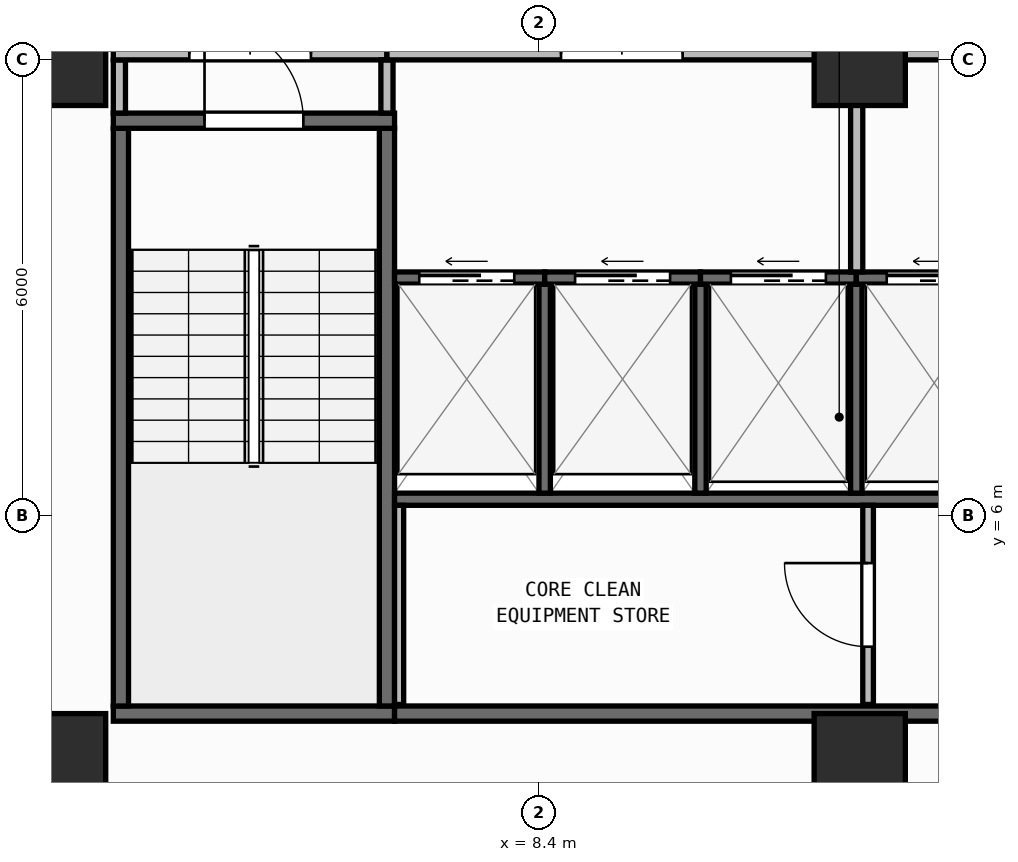
"""IFC4 building model, lengths in metres.
Left out: names, types, materials, properties, quantities, classifications, styles, units other than length and angle.
Written with IfcOpenShell. Run it as: python <this file> out.ifc"""

import sys

from ifc_helpers import new_model, si_unit, direction, frame, frame_2d, origin, origin_2d, place, context, subcontext, project, spatial, rectangle, extrude, element, fill, save


model = new_model("IFC4")
c1 = context("Model", 3, precision=1e-05, world=origin(), true_north=direction((0.0, 1.0)))
c2 = subcontext(c1, "Body", "Model", "MODEL_VIEW")
j1 = project(units=[si_unit("LENGTHUNIT", "METRE"), si_unit("PLANEANGLEUNIT", "RADIAN")], contexts=[c1])
p1 = place(None, origin())
s1 = spatial("IfcSite", under=j1, at=p1, CompositionType="ELEMENT")
p2 = place(p1, origin())
s2 = spatial("IfcBuilding", under=s1, at=p2, CompositionType="ELEMENT")
p3 = place(p2, frame((0.0, 0.0, 170.5)))
s3 = spatial("IfcBuildingStorey", under=s2, at=p3, CompositionType="ELEMENT", Elevation=170.5)
for number, where, z_axis, x_axis in (
    (1, (2.1, 2.8, 0.0), (0.0, 0.0, 1.0), (1.0, 0.0, 0.0)),
    (2, (12.62, 2.8, 0.0), (0.0, 0.0, 1.0), (1.0, 0.0, 0.0)),
    (3, (2.1, 12.0, 0.0), (0.0, 0.0, 1.0), (1.0, 0.0, 0.0)),
    (4, (12.62, 12.0, 0.0), (0.0, 0.0, 1.0), (1.0, 0.0, 0.0)),
):
    element("IfcColumn", number, at=place(p3, frame(where, z_axis=z_axis, x_axis=x_axis)), inside=s3, PredefinedType="COLUMN", context=c2, shape_type="SweptSolid", body=[
        extrude(rectangle(XDim=1.2, YDim=1.2, at=origin_2d()), origin(), (0.0, 0.0, 1.0), 3.95),
    ])
p4 = place(p3, frame((2.76, 0.173, 0.0), z_axis=(0.0, 0.0, 1.0), x_axis=(0.996857931723, 0.079210251617, 0.0)))
e5 = element("IfcWall", 5, at=p4, inside=s3, PredefinedType="STANDARD", context=c2, shape_type="SweptSolid", body=[
    extrude(rectangle(XDim=51.442, YDim=0.26, at=frame_2d((25.721, 0.0))), origin(), (0.0, 0.0, 1.0), 3.67),
])
p5 = place(p4, frame((24.521, 0.0, 0.9)))
e6 = element("IfcOpeningElement", 6, at=p5, cuts=e5, PredefinedType="OPENING", context=c2, shape_type="SweptSolid", body=[
    extrude(rectangle(XDim=2.4, YDim=1.65, at=frame_2d((1.2, 0.825))), frame((0.0, 0.14, 0.0), z_axis=(0.0, -1.0, 0.0), x_axis=(1.0, 0.0, 0.0)), (0.0, 0.0, 1.0), 0.28),
])
p6 = place(p3, frame((2.8, 3.4, 0.0), z_axis=(0.0, 0.0, 1.0), x_axis=(1.0, 0.0, 0.0)))
e7 = element("IfcWall", 7, at=p6, inside=s3, PredefinedType="SHEAR", context=c2, shape_type="SweptSolid", body=[
    extrude(rectangle(XDim=3.7, YDim=0.2, at=frame_2d((1.85, 0.0))), origin(), (0.0, 0.0, 1.0), 3.67),
])
for number, where, z_axis, x_axis in (
    (8, (2.9, 3.5, 0.0), (0.0, 0.0, 1.0), (0.0, 1.0, 0.0)),
    (9, (6.4, 3.5, 0.0), (0.0, 0.0, 1.0), (0.0, 1.0, 0.0)),
):
    element("IfcWall", number, at=place(p3, frame(where, z_axis=z_axis, x_axis=x_axis)), inside=s3, PredefinedType="SHEAR", context=c2, shape_type="SweptSolid", body=[
        extrude(rectangle(XDim=7.6, YDim=0.2, at=frame_2d((3.8, 0.0))), origin(), (0.0, 0.0, 1.0), 3.67),
    ])
p7 = place(p3, frame((2.8, 11.2, 0.0), z_axis=(0.0, 0.0, 1.0), x_axis=(1.0, 0.0, 0.0)))
e10 = element("IfcWall", 10, at=p7, inside=s3, PredefinedType="SHEAR", context=c2, shape_type="SweptSolid", body=[
    extrude(rectangle(XDim=3.7, YDim=0.2, at=frame_2d((1.85, 0.0))), origin(), (0.0, 0.0, 1.0), 3.67),
])
p8 = place(p7, frame((1.2, 0.0, 0.0)))
e11 = element("IfcOpeningElement", 11, at=p8, cuts=e10, PredefinedType="OPENING", context=c2, shape_type="SweptSolid", body=[
    extrude(rectangle(XDim=1.3, YDim=2.15, at=frame_2d((0.65, 1.075))), frame((0.0, 0.11, 0.0), z_axis=(0.0, -1.0, 0.0), x_axis=(1.0, 0.0, 0.0)), (0.0, 0.0, 1.0), 0.22),
])
p9 = place(p3, frame((6.5, 3.4, 0.0), z_axis=(0.0, 0.0, 1.0), x_axis=(1.0, 0.0, 0.0)))
e12 = element("IfcWall", 12, at=p9, inside=s3, PredefinedType="SHEAR", context=c2, shape_type="SweptSolid", body=[
    extrude(rectangle(XDim=13.7, YDim=0.2, at=frame_2d((6.85, 0.0))), origin(), (0.0, 0.0, 1.0), 3.67),
])
p10 = place(p3, frame((6.5, 6.22, 0.0), z_axis=(0.0, 0.0, 1.0), x_axis=(1.0, 0.0, 0.0)))
e13 = element("IfcWall", 13, at=p10, inside=s3, PredefinedType="SHEAR", context=c2, shape_type="SweptSolid", body=[
    extrude(rectangle(XDim=12.11, YDim=0.16, at=frame_2d((6.055, 0.0))), origin(), (0.0, 0.0, 1.0), 3.67),
])
for number, where, z_axis, x_axis in (
    (14, (8.475, 6.3, 0.0), (0.0, 0.0, 1.0), (0.0, 1.0, 0.0)),
    (15, (10.525, 6.3, 0.0), (0.0, 0.0, 1.0), (0.0, 1.0, 0.0)),
    (16, (12.575, 6.3, 0.0), (0.0, 0.0, 1.0), (0.0, 1.0, 0.0)),
):
    element("IfcWall", number, at=place(p3, frame(where, z_axis=z_axis, x_axis=x_axis)), inside=s3, PredefinedType="SHEAR", context=c2, shape_type="SweptSolid", body=[
        extrude(rectangle(XDim=2.75, YDim=0.15, at=frame_2d((1.375, 0.0))), origin(), (0.0, 0.0, 1.0), 3.67),
    ])
p11 = place(p3, frame((6.5, 9.13, 0.0), z_axis=(0.0, 0.0, 1.0), x_axis=(1.0, 0.0, 0.0)))
e17 = element("IfcWall", 17, at=p11, inside=s3, PredefinedType="SHEAR", context=c2, shape_type="SweptSolid", body=[
    extrude(rectangle(XDim=1.975, YDim=0.16, at=frame_2d((0.988, 0.0))), origin(), (0.0, 0.0, 1.0), 3.67),
])
p12 = place(p11, frame((0.325, 0.0, 0.0)))
e18 = element("IfcOpeningElement", 18, at=p12, cuts=e17, PredefinedType="OPENING", context=c2, shape_type="SweptSolid", body=[
    extrude(rectangle(XDim=1.25, YDim=2.15, at=frame_2d((0.625, 1.075))), frame((0.0, 0.09, 0.0), z_axis=(0.0, -1.0, 0.0), x_axis=(1.0, 0.0, 0.0)), (0.0, 0.0, 1.0), 0.18),
])
p13 = place(p3, frame((8.475, 9.13, 0.0), z_axis=(0.0, 0.0, 1.0), x_axis=(1.0, 0.0, 0.0)))
e19 = element("IfcWall", 19, at=p13, inside=s3, PredefinedType="SHEAR", context=c2, shape_type="SweptSolid", body=[
    extrude(rectangle(XDim=2.05, YDim=0.16, at=frame_2d((1.025, 0.0))), origin(), (0.0, 0.0, 1.0), 3.67),
])
p14 = place(p13, frame((0.4, 0.0, 0.0)))
e20 = element("IfcOpeningElement", 20, at=p14, cuts=e19, PredefinedType="OPENING", context=c2, shape_type="SweptSolid", body=[
    extrude(rectangle(XDim=1.25, YDim=2.15, at=frame_2d((0.625, 1.075))), frame((0.0, 0.09, 0.0), z_axis=(0.0, -1.0, 0.0), x_axis=(1.0, 0.0, 0.0)), (0.0, 0.0, 1.0), 0.18),
])
p15 = place(p3, frame((10.525, 9.13, 0.0), z_axis=(0.0, 0.0, 1.0), x_axis=(1.0, 0.0, 0.0)))
e21 = element("IfcWall", 21, at=p15, inside=s3, PredefinedType="SHEAR", context=c2, shape_type="SweptSolid", body=[
    extrude(rectangle(XDim=2.05, YDim=0.16, at=frame_2d((1.025, 0.0))), origin(), (0.0, 0.0, 1.0), 3.67),
])
p16 = place(p15, frame((0.4, 0.0, 0.0)))
e22 = element("IfcOpeningElement", 22, at=p16, cuts=e21, PredefinedType="OPENING", context=c2, shape_type="SweptSolid", body=[
    extrude(rectangle(XDim=1.25, YDim=2.15, at=frame_2d((0.625, 1.075))), frame((0.0, 0.09, 0.0), z_axis=(0.0, -1.0, 0.0), x_axis=(1.0, 0.0, 0.0)), (0.0, 0.0, 1.0), 0.18),
])
p17 = place(p3, frame((12.575, 9.13, 0.0), z_axis=(0.0, 0.0, 1.0), x_axis=(1.0, 0.0, 0.0)))
e23 = element("IfcWall", 23, at=p17, inside=s3, PredefinedType="SHEAR", context=c2, shape_type="SweptSolid", body=[
    extrude(rectangle(XDim=2.05, YDim=0.16, at=frame_2d((1.025, 0.0))), origin(), (0.0, 0.0, 1.0), 3.67),
])
p18 = place(p17, frame((0.4, 0.0, 0.0)))
e24 = element("IfcOpeningElement", 24, at=p18, cuts=e23, PredefinedType="OPENING", context=c2, shape_type="SweptSolid", body=[
    extrude(rectangle(XDim=1.25, YDim=2.15, at=frame_2d((0.625, 1.075))), frame((0.0, 0.09, 0.0), z_axis=(0.0, -1.0, 0.0), x_axis=(1.0, 0.0, 0.0)), (0.0, 0.0, 1.0), 0.18),
])
p19 = place(p3, frame((6.56, 3.52, 0.0), z_axis=(0.0, 0.0, 1.0), x_axis=(0.0, 1.0, 0.0)))
e25 = element("IfcWall", 25, at=p19, inside=s3, PredefinedType="PARTITIONING", context=c2, shape_type="SweptSolid", body=[
    extrude(rectangle(XDim=2.62, YDim=0.12, at=frame_2d((1.31, 0.0))), origin(), (0.0, 0.0, 1.0), 3.67),
])
p20 = place(p3, frame((12.73, 3.52, 0.0), z_axis=(0.0, 0.0, 1.0), x_axis=(0.0, 1.0, 0.0)))
e26 = element("IfcWall", 26, at=p20, inside=s3, PredefinedType="PARTITIONING", context=c2, shape_type="SweptSolid", body=[
    extrude(rectangle(XDim=2.62, YDim=0.14, at=frame_2d((1.31, 0.0))), origin(), (0.0, 0.0, 1.0), 3.67),
])
p21 = place(p20, frame((0.76, 0.0, 0.0)))
e27 = element("IfcOpeningElement", 27, at=p21, cuts=e26, PredefinedType="OPENING", context=c2, shape_type="SweptSolid", body=[
    extrude(rectangle(XDim=1.1, YDim=2.1, at=frame_2d((0.55, 1.05))), frame((0.0, 0.08, 0.0), z_axis=(0.0, -1.0, 0.0), x_axis=(1.0, 0.0, 0.0)), (0.0, 0.0, 1.0), 0.16),
])
p22 = place(p3, frame((2.88, 11.3, 0.0), z_axis=(0.0, 0.0, 1.0), x_axis=(0.0, 1.0, 0.0)))
e28 = element("IfcWall", 28, at=p22, inside=s3, PredefinedType="PARTITIONING", context=c2, shape_type="SweptSolid", body=[
    extrude(rectangle(XDim=0.7, YDim=0.16, at=frame_2d((0.35, 0.0))), origin(), (0.0, 0.0, 1.0), 3.67),
])
p23 = place(p3, frame((2.8, 12.08, 0.0), z_axis=(0.0, 0.0, 1.0), x_axis=(1.0, 0.0, 0.0)))
e29 = element("IfcWall", 29, at=p23, inside=s3, PredefinedType="PARTITIONING", context=c2, shape_type="SweptSolid", body=[
    extrude(rectangle(XDim=3.6, YDim=0.16, at=frame_2d((1.8, 0.0))), origin(), (0.0, 0.0, 1.0), 3.043),
])
p24 = place(p23, frame((1.0, 0.0, 0.0)))
e30 = element("IfcOpeningElement", 30, at=p24, cuts=e29, PredefinedType="OPENING", context=c2, shape_type="SweptSolid", body=[
    extrude(rectangle(XDim=1.6, YDim=2.05, at=frame_2d((0.8, 1.025))), frame((0.0, 0.09, 0.0), z_axis=(0.0, -1.0, 0.0), x_axis=(1.0, 0.0, 0.0)), (0.0, 0.0, 1.0), 0.18),
])
p25 = place(p3, frame((6.4, 11.3, 0.0), z_axis=(0.0, 0.0, 1.0), x_axis=(0.0, 1.0, 0.0)))
e31 = element("IfcWall", 31, at=p25, inside=s3, PredefinedType="PARTITIONING", context=c2, shape_type="SweptSolid", body=[
    extrude(rectangle(XDim=0.7, YDim=0.16, at=frame_2d((0.35, 0.0))), origin(), (0.0, 0.0, 1.0), 3.67),
])
p26 = place(p3, frame((6.4, 12.08, 0.0), z_axis=(0.0, 0.0, 1.0), x_axis=(1.0, 0.0, 0.0)))
e32 = element("IfcWall", 32, at=p26, inside=s3, PredefinedType="PARTITIONING", context=c2, shape_type="SweptSolid", body=[
    extrude(rectangle(XDim=6.18, YDim=0.16, at=frame_2d((3.09, 0.0))), origin(), (0.0, 0.0, 1.0), 3.043),
])
p27 = place(p26, frame((2.29, 0.0, 0.0)))
e33 = element("IfcOpeningElement", 33, at=p27, cuts=e32, PredefinedType="OPENING", context=c2, shape_type="SweptSolid", body=[
    extrude(rectangle(XDim=1.6, YDim=2.05, at=frame_2d((0.8, 1.025))), frame((0.0, 0.09, 0.0), z_axis=(0.0, -1.0, 0.0), x_axis=(1.0, 0.0, 0.0)), (0.0, 0.0, 1.0), 0.18),
])
p28 = place(p3, frame((12.58, 9.21, 0.0), z_axis=(0.0, 0.0, 1.0), x_axis=(0.0, 1.0, 0.0)))
e34 = element("IfcWall", 34, at=p28, inside=s3, PredefinedType="PARTITIONING", context=c2, shape_type="SweptSolid", body=[
    extrude(rectangle(XDim=2.79, YDim=0.16, at=frame_2d((1.395, 0.0))), origin(), (0.0, 0.0, 1.0), 3.67),
])
p29 = place(p3, frame((12.58, 12.08, 0.0), z_axis=(0.0, 0.0, 1.0), x_axis=(1.0, 0.0, 0.0)))
e35 = element("IfcWall", 35, at=p29, inside=s3, PredefinedType="PARTITIONING", context=c2, shape_type="SweptSolid", body=[
    extrude(rectangle(XDim=7.7, YDim=0.16, at=frame_2d((3.85, 0.0))), origin(), (0.0, 0.0, 1.0), 3.043),
])
p30 = place(p29, frame((3.05, 0.0, 0.0)))
e36 = element("IfcOpeningElement", 36, at=p30, cuts=e35, PredefinedType="OPENING", context=c2, shape_type="SweptSolid", body=[
    extrude(rectangle(XDim=1.6, YDim=2.05, at=frame_2d((0.8, 1.025))), frame((0.0, 0.09, 0.0), z_axis=(0.0, -1.0, 0.0), x_axis=(1.0, 0.0, 0.0)), (0.0, 0.0, 1.0), 0.18),
])
p31 = place(p8, origin())
e37 = element("IfcDoor", 37, at=p31, inside=s3, OperationType="SINGLE_SWING_LEFT", PredefinedType="DOOR", context=c2, shape_type="SweptSolid", body=[
    extrude(rectangle(XDim=1.3, YDim=2.15, at=frame_2d((0.65, 1.075))), frame((0.0, 0.025, 0.0), z_axis=(0.0, -1.0, 0.0), x_axis=(1.0, 0.0, 0.0)), (0.0, 0.0, 1.0), 0.05),
])
fill(e11, e37)
p32 = place(p12, origin())
e38 = element("IfcDoor", 38, at=p32, inside=s3, OperationType="SLIDING_TO_LEFT", PredefinedType="DOOR", context=c2, shape_type="SweptSolid", body=[
    extrude(rectangle(XDim=1.25, YDim=2.15, at=frame_2d((0.625, 1.075))), frame((0.0, 0.025, 0.0), z_axis=(0.0, -1.0, 0.0), x_axis=(1.0, 0.0, 0.0)), (0.0, 0.0, 1.0), 0.05),
])
fill(e18, e38)
p33 = place(p14, origin())
e39 = element("IfcDoor", 39, at=p33, inside=s3, OperationType="SLIDING_TO_LEFT", PredefinedType="DOOR", context=c2, shape_type="SweptSolid", body=[
    extrude(rectangle(XDim=1.25, YDim=2.15, at=frame_2d((0.625, 1.075))), frame((0.0, 0.025, 0.0), z_axis=(0.0, -1.0, 0.0), x_axis=(1.0, 0.0, 0.0)), (0.0, 0.0, 1.0), 0.05),
])
fill(e20, e39)
p34 = place(p16, origin())
e40 = element("IfcDoor", 40, at=p34, inside=s3, OperationType="SLIDING_TO_LEFT", PredefinedType="DOOR", context=c2, shape_type="SweptSolid", body=[
    extrude(rectangle(XDim=1.25, YDim=2.15, at=frame_2d((0.625, 1.075))), frame((0.0, 0.025, 0.0), z_axis=(0.0, -1.0, 0.0), x_axis=(1.0, 0.0, 0.0)), (0.0, 0.0, 1.0), 0.05),
])
fill(e22, e40)
p35 = place(p18, origin())
e41 = element("IfcDoor", 41, at=p35, inside=s3, OperationType="SLIDING_TO_LEFT", PredefinedType="DOOR", context=c2, shape_type="SweptSolid", body=[
    extrude(rectangle(XDim=1.25, YDim=2.15, at=frame_2d((0.625, 1.075))), frame((0.0, 0.025, 0.0), z_axis=(0.0, -1.0, 0.0), x_axis=(1.0, 0.0, 0.0)), (0.0, 0.0, 1.0), 0.05),
])
fill(e24, e41)
p36 = place(p21, origin())
e42 = element("IfcDoor", 42, at=p36, inside=s3, OperationType="SINGLE_SWING_RIGHT", PredefinedType="DOOR", context=c2, shape_type="SweptSolid", body=[
    extrude(rectangle(XDim=1.1, YDim=2.1, at=frame_2d((0.55, 1.05))), frame((0.0, 0.025, 0.0), z_axis=(0.0, -1.0, 0.0), x_axis=(1.0, 0.0, 0.0)), (0.0, 0.0, 1.0), 0.05),
])
fill(e27, e42)
p37 = place(p24, origin())
e43 = element("IfcDoor", 43, at=p37, inside=s3, OperationType="DOUBLE_DOOR_SINGLE_SWING", PredefinedType="DOOR", context=c2, shape_type="SweptSolid", body=[
    extrude(rectangle(XDim=1.6, YDim=2.05, at=frame_2d((0.8, 1.025))), frame((0.0, 0.025, 0.0), z_axis=(0.0, -1.0, 0.0), x_axis=(1.0, 0.0, 0.0)), (0.0, 0.0, 1.0), 0.05),
])
fill(e30, e43)
p38 = place(p27, origin())
e44 = element("IfcDoor", 44, at=p38, inside=s3, OperationType="DOUBLE_DOOR_SINGLE_SWING", PredefinedType="DOOR", context=c2, shape_type="SweptSolid", body=[
    extrude(rectangle(XDim=1.6, YDim=2.05, at=frame_2d((0.8, 1.025))), frame((0.0, 0.025, 0.0), z_axis=(0.0, -1.0, 0.0), x_axis=(1.0, 0.0, 0.0)), (0.0, 0.0, 1.0), 0.05),
])
fill(e33, e44)
save(model, sys.argv[1])
